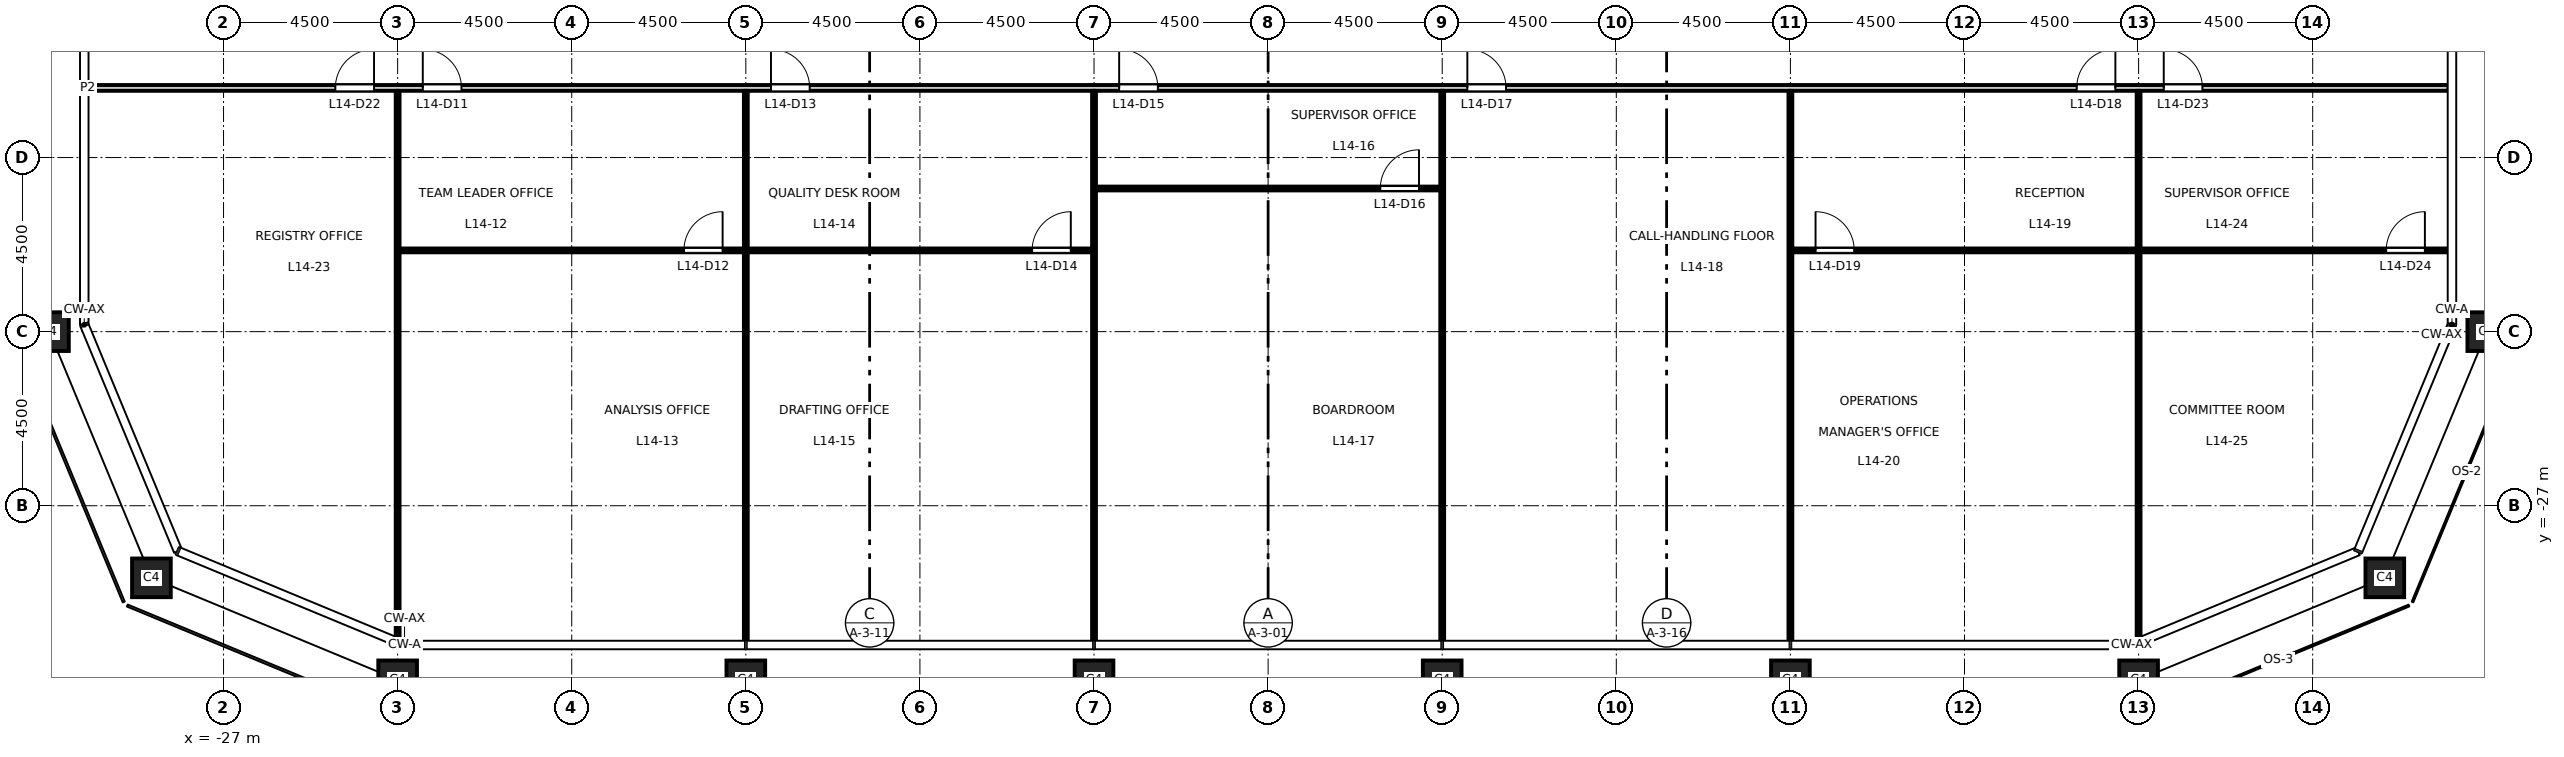
"""IFC4 building model, lengths in metres.
Left out: names, types, materials, properties, quantities, classifications, styles, units other than length and angle.
Written with IfcOpenShell. Run it as: python <this file> out.ifc"""

import sys

from ifc_helpers import new_model, si_unit, direction, frame, frame_2d, origin, origin_2d, place, context, subcontext, project, spatial, rectangle, hollow_rectangle, extrude, element, fill, save


model = new_model("IFC4")
c1 = context("Model", 3, precision=1e-05, world=origin(), true_north=direction((0.0, 1.0)))
c2 = subcontext(c1, "Body", "Model", "MODEL_VIEW")
j1 = project(units=[si_unit("LENGTHUNIT", "METRE"), si_unit("PLANEANGLEUNIT", "RADIAN")], contexts=[c1])
p1 = place(None, origin())
s1 = spatial("IfcSite", under=j1, at=p1, CompositionType="ELEMENT")
p2 = place(p1, origin())
s2 = spatial("IfcBuilding", under=s1, at=p2, CompositionType="ELEMENT")
p3 = place(p2, frame((0.0, 0.0, 67.2)))
s3 = spatial("IfcBuildingStorey", under=s2, at=p3, CompositionType="ELEMENT", Elevation=67.2)
for number, where, z_axis, x_axis in (
    (1, (-22.5, -31.5, 0.0), (0.0, 0.0, 1.0), (1.0, 0.0, 0.0)),
    (2, (-13.5, -31.5, 0.0), (0.0, 0.0, 1.0), (1.0, 0.0, 0.0)),
    (3, (-4.5, -31.5, 0.0), (0.0, 0.0, 1.0), (1.0, 0.0, 0.0)),
    (4, (4.5, -31.5, 0.0), (0.0, 0.0, 1.0), (1.0, 0.0, 0.0)),
    (5, (13.5, -31.5, 0.0), (0.0, 0.0, 1.0), (1.0, 0.0, 0.0)),
    (6, (22.5, -31.5, 0.0), (0.0, 0.0, 1.0), (1.0, 0.0, 0.0)),
    (7, (28.864, -28.864, 0.0), (0.0, 0.0, 1.0), (1.0, 0.0, 0.0)),
    (8, (31.5, -22.5, 0.0), (0.0, 0.0, 1.0), (1.0, 0.0, 0.0)),
    (9, (-31.5, -22.5, 0.0), (0.0, 0.0, 1.0), (1.0, 0.0, 0.0)),
    (10, (-28.864, -28.864, 0.0), (0.0, 0.0, 1.0), (1.0, 0.0, 0.0)),
):
    element("IfcColumn", number, at=place(p3, frame(where, z_axis=z_axis, x_axis=x_axis)), inside=s3, PredefinedType="COLUMN", context=c2, shape_type="SweptSolid", body=[
        extrude(hollow_rectangle(XDim=1.0, YDim=1.0, WallThickness=0.06, at=origin_2d()), origin(), (0.0, 0.0, 1.0), 4.5),
    ])
p4 = place(p3, frame((-22.45, -20.4, 0.0), z_axis=(0.0, 0.0, 1.0), x_axis=(1.0, 0.0, 0.0)))
e11 = element("IfcWall", 11, at=p4, inside=s3, PredefinedType="PARTITIONING", context=c2, shape_type="SweptSolid", body=[
    extrude(rectangle(XDim=17.9, YDim=0.1, at=frame_2d((8.95, 0.0))), origin(), (0.0, 0.0, 1.0), 4.35),
])
p5 = place(p4, frame((7.35, 0.0, 0.0)))
e12 = element("IfcOpeningElement", 12, at=p5, cuts=e11, PredefinedType="OPENING", context=c2, shape_type="SweptSolid", body=[
    extrude(rectangle(XDim=1.0, YDim=2.1, at=frame_2d((0.5, 1.05))), frame((0.0, 0.06, 0.0), z_axis=(0.0, -1.0, 0.0), x_axis=(1.0, 0.0, 0.0)), (0.0, 0.0, 1.0), 0.12),
])
p6 = place(p4, frame((16.35, 0.0, 0.0)))
e13 = element("IfcOpeningElement", 13, at=p6, cuts=e11, PredefinedType="OPENING", context=c2, shape_type="SweptSolid", body=[
    extrude(rectangle(XDim=1.0, YDim=2.1, at=frame_2d((0.5, 1.05))), frame((0.0, 0.06, 0.0), z_axis=(0.0, -1.0, 0.0), x_axis=(1.0, 0.0, 0.0)), (0.0, 0.0, 1.0), 0.12),
])
p7 = place(p3, frame((13.55, -20.4, 0.0), z_axis=(0.0, 0.0, 1.0), x_axis=(1.0, 0.0, 0.0)))
e14 = element("IfcWall", 14, at=p7, inside=s3, PredefinedType="PARTITIONING", context=c2, shape_type="SweptSolid", body=[
    extrude(rectangle(XDim=16.96, YDim=0.1, at=frame_2d((8.48, 0.0))), origin(), (0.0, 0.0, 1.0), 4.35),
])
p8 = place(p7, frame((0.6, 0.0, 0.0)))
e15 = element("IfcOpeningElement", 15, at=p8, cuts=e14, PredefinedType="OPENING", context=c2, shape_type="SweptSolid", body=[
    extrude(rectangle(XDim=1.0, YDim=2.1, at=frame_2d((0.5, 1.05))), frame((0.0, 0.06, 0.0), z_axis=(0.0, -1.0, 0.0), x_axis=(1.0, 0.0, 0.0)), (0.0, 0.0, 1.0), 0.12),
])
p9 = place(p7, frame((15.35, 0.0, 0.0)))
e16 = element("IfcOpeningElement", 16, at=p9, cuts=e14, PredefinedType="OPENING", context=c2, shape_type="SweptSolid", body=[
    extrude(rectangle(XDim=1.0, YDim=2.1, at=frame_2d((0.5, 1.05))), frame((0.0, 0.06, 0.0), z_axis=(0.0, -1.0, 0.0), x_axis=(1.0, 0.0, 0.0)), (0.0, 0.0, 1.0), 0.12),
])
p10 = place(p3, frame((-4.45, -18.8, 0.0), z_axis=(0.0, 0.0, 1.0), x_axis=(1.0, 0.0, 0.0)))
e17 = element("IfcWall", 17, at=p10, inside=s3, PredefinedType="PARTITIONING", context=c2, shape_type="SweptSolid", body=[
    extrude(rectangle(XDim=8.9, YDim=0.1, at=frame_2d((4.45, 0.0))), origin(), (0.0, 0.0, 1.0), 4.35),
])
p11 = place(p10, frame((7.35, 0.0, 0.0)))
e18 = element("IfcOpeningElement", 18, at=p11, cuts=e17, PredefinedType="OPENING", context=c2, shape_type="SweptSolid", body=[
    extrude(rectangle(XDim=1.0, YDim=2.1, at=frame_2d((0.5, 1.05))), frame((0.0, 0.06, 0.0), z_axis=(0.0, -1.0, 0.0), x_axis=(1.0, 0.0, 0.0)), (0.0, 0.0, 1.0), 0.12),
])
p12 = place(p3, frame((-30.51, -16.2, 0.0), z_axis=(0.0, 0.0, 1.0), x_axis=(1.0, 0.0, 0.0)))
e19 = element("IfcWall", 19, at=p12, inside=s3, PredefinedType="PARTITIONING", context=c2, shape_type="SweptSolid", body=[
    extrude(rectangle(XDim=61.02, YDim=0.15, at=frame_2d((30.51, 0.0))), origin(), (0.0, 0.0, 1.0), 4.35),
])
p13 = place(p12, frame((8.66, 0.0, 0.0)))
e20 = element("IfcOpeningElement", 20, at=p13, cuts=e19, PredefinedType="OPENING", context=c2, shape_type="SweptSolid", body=[
    extrude(rectangle(XDim=1.0, YDim=2.1, at=frame_2d((0.5, 1.05))), frame((0.0, 0.085, 0.0), z_axis=(0.0, -1.0, 0.0), x_axis=(1.0, 0.0, 0.0)), (0.0, 0.0, 1.0), 0.17),
])
p14 = place(p12, frame((17.66, 0.0, 0.0)))
e21 = element("IfcOpeningElement", 21, at=p14, cuts=e19, PredefinedType="OPENING", context=c2, shape_type="SweptSolid", body=[
    extrude(rectangle(XDim=1.0, YDim=2.1, at=frame_2d((0.5, 1.05))), frame((0.0, 0.085, 0.0), z_axis=(0.0, -1.0, 0.0), x_axis=(1.0, 0.0, 0.0)), (0.0, 0.0, 1.0), 0.17),
])
p15 = place(p12, frame((26.66, 0.0, 0.0)))
e22 = element("IfcOpeningElement", 22, at=p15, cuts=e19, PredefinedType="OPENING", context=c2, shape_type="SweptSolid", body=[
    extrude(rectangle(XDim=1.0, YDim=2.1, at=frame_2d((0.5, 1.05))), frame((0.0, 0.085, 0.0), z_axis=(0.0, -1.0, 0.0), x_axis=(1.0, 0.0, 0.0)), (0.0, 0.0, 1.0), 0.17),
])
p16 = place(p12, frame((35.66, 0.0, 0.0)))
e23 = element("IfcOpeningElement", 23, at=p16, cuts=e19, PredefinedType="OPENING", context=c2, shape_type="SweptSolid", body=[
    extrude(rectangle(XDim=1.0, YDim=2.1, at=frame_2d((0.5, 1.05))), frame((0.0, 0.085, 0.0), z_axis=(0.0, -1.0, 0.0), x_axis=(1.0, 0.0, 0.0)), (0.0, 0.0, 1.0), 0.17),
])
p17 = place(p12, frame((51.41, 0.0, 0.0)))
e24 = element("IfcOpeningElement", 24, at=p17, cuts=e19, PredefinedType="OPENING", context=c2, shape_type="SweptSolid", body=[
    extrude(rectangle(XDim=1.0, YDim=2.1, at=frame_2d((0.5, 1.05))), frame((0.0, 0.085, 0.0), z_axis=(0.0, -1.0, 0.0), x_axis=(1.0, 0.0, 0.0)), (0.0, 0.0, 1.0), 0.17),
])
p18 = place(p12, frame((6.4, 0.0, 0.0)))
e25 = element("IfcOpeningElement", 25, at=p18, cuts=e19, PredefinedType="OPENING", context=c2, shape_type="SweptSolid", body=[
    extrude(rectangle(XDim=1.0, YDim=2.1, at=frame_2d((0.5, 1.05))), frame((0.0, 0.085, 0.0), z_axis=(0.0, -1.0, 0.0), x_axis=(1.0, 0.0, 0.0)), (0.0, 0.0, 1.0), 0.17),
])
p19 = place(p12, frame((53.66, 0.0, 0.0)))
e26 = element("IfcOpeningElement", 26, at=p19, cuts=e19, PredefinedType="OPENING", context=c2, shape_type="SweptSolid", body=[
    extrude(rectangle(XDim=1.0, YDim=2.1, at=frame_2d((0.5, 1.05))), frame((0.0, 0.085, 0.0), z_axis=(0.0, -1.0, 0.0), x_axis=(1.0, 0.0, 0.0)), (0.0, 0.0, 1.0), 0.17),
])
p20 = place(p3, frame((-22.5, -30.428, 0.0), z_axis=(0.0, 0.0, 1.0), x_axis=(0.0, 1.0, 0.0)))
e27 = element("IfcWall", 27, at=p20, inside=s3, PredefinedType="PARTITIONING", context=c2, shape_type="SweptSolid", body=[
    extrude(rectangle(XDim=14.153, YDim=0.1, at=frame_2d((7.077, 0.0))), origin(), (0.0, 0.0, 1.0), 3.35),
])
p21 = place(p3, frame((-13.5, -30.51, 0.0), z_axis=(0.0, 0.0, 1.0), x_axis=(0.0, 1.0, 0.0)))
e28 = element("IfcWall", 28, at=p21, inside=s3, PredefinedType="PARTITIONING", context=c2, shape_type="SweptSolid", body=[
    extrude(rectangle(XDim=10.06, YDim=0.1, at=frame_2d((5.03, 0.0))), origin(), (0.0, 0.0, 1.0), 3.35),
])
p22 = place(p3, frame((-13.5, -20.35, 0.0), z_axis=(0.0, 0.0, 1.0), x_axis=(0.0, 1.0, 0.0)))
e29 = element("IfcWall", 29, at=p22, inside=s3, PredefinedType="PARTITIONING", context=c2, shape_type="SweptSolid", body=[
    extrude(rectangle(XDim=4.075, YDim=0.1, at=frame_2d((2.038, 0.0))), origin(), (0.0, 0.0, 1.0), 3.35),
])
for number, where, z_axis, x_axis in (
    (30, (-4.5, -30.51, 0.0), (0.0, 0.0, 1.0), (0.0, 1.0, 0.0)),
    (31, (4.5, -30.51, 0.0), (0.0, 0.0, 1.0), (0.0, 1.0, 0.0)),
    (32, (13.5, -30.51, 0.0), (0.0, 0.0, 1.0), (0.0, 1.0, 0.0)),
):
    element("IfcWall", number, at=place(p3, frame(where, z_axis=z_axis, x_axis=x_axis)), inside=s3, PredefinedType="PARTITIONING", context=c2, shape_type="SweptSolid", body=[
        extrude(rectangle(XDim=14.235, YDim=0.1, at=frame_2d((7.118, 0.0))), origin(), (0.0, 0.0, 1.0), 3.35),
    ])
p23 = place(p3, frame((22.5, -30.428, 0.0), z_axis=(0.0, 0.0, 1.0), x_axis=(0.0, 1.0, 0.0)))
e33 = element("IfcWall", 33, at=p23, inside=s3, PredefinedType="PARTITIONING", context=c2, shape_type="SweptSolid", body=[
    extrude(rectangle(XDim=9.978, YDim=0.1, at=frame_2d((4.989, 0.0))), origin(), (0.0, 0.0, 1.0), 3.35),
])
p24 = place(p3, frame((22.5, -20.35, 0.0), z_axis=(0.0, 0.0, 1.0), x_axis=(0.0, 1.0, 0.0)))
e34 = element("IfcWall", 34, at=p24, inside=s3, PredefinedType="PARTITIONING", context=c2, shape_type="SweptSolid", body=[
    extrude(rectangle(XDim=4.075, YDim=0.1, at=frame_2d((2.038, 0.0))), origin(), (0.0, 0.0, 1.0), 3.35),
])
p25 = place(p13, origin())
e35 = element("IfcDoor", 35, at=p25, inside=s3, OperationType="SINGLE_SWING_LEFT", PredefinedType="DOOR", context=c2, shape_type="SweptSolid", body=[
    extrude(rectangle(XDim=1.0, YDim=2.1, at=frame_2d((0.5, 1.05))), frame((0.0, 0.025, 0.0), z_axis=(0.0, -1.0, 0.0), x_axis=(1.0, 0.0, 0.0)), (0.0, 0.0, 1.0), 0.05),
])
fill(e20, e35)
p26 = place(p5, origin())
e36 = element("IfcDoor", 36, at=p26, inside=s3, OperationType="SINGLE_SWING_RIGHT", PredefinedType="DOOR", context=c2, shape_type="SweptSolid", body=[
    extrude(rectangle(XDim=1.0, YDim=2.1, at=frame_2d((0.5, 1.05))), frame((0.0, 0.025, 0.0), z_axis=(0.0, -1.0, 0.0), x_axis=(1.0, 0.0, 0.0)), (0.0, 0.0, 1.0), 0.05),
])
fill(e12, e36)
p27 = place(p14, origin())
e37 = element("IfcDoor", 37, at=p27, inside=s3, OperationType="SINGLE_SWING_LEFT", PredefinedType="DOOR", context=c2, shape_type="SweptSolid", body=[
    extrude(rectangle(XDim=1.0, YDim=2.1, at=frame_2d((0.5, 1.05))), frame((0.0, 0.025, 0.0), z_axis=(0.0, -1.0, 0.0), x_axis=(1.0, 0.0, 0.0)), (0.0, 0.0, 1.0), 0.05),
])
fill(e21, e37)
p28 = place(p6, origin())
e38 = element("IfcDoor", 38, at=p28, inside=s3, OperationType="SINGLE_SWING_RIGHT", PredefinedType="DOOR", context=c2, shape_type="SweptSolid", body=[
    extrude(rectangle(XDim=1.0, YDim=2.1, at=frame_2d((0.5, 1.05))), frame((0.0, 0.025, 0.0), z_axis=(0.0, -1.0, 0.0), x_axis=(1.0, 0.0, 0.0)), (0.0, 0.0, 1.0), 0.05),
])
fill(e13, e38)
p29 = place(p15, origin())
e39 = element("IfcDoor", 39, at=p29, inside=s3, OperationType="SINGLE_SWING_LEFT", PredefinedType="DOOR", context=c2, shape_type="SweptSolid", body=[
    extrude(rectangle(XDim=1.0, YDim=2.1, at=frame_2d((0.5, 1.05))), frame((0.0, 0.025, 0.0), z_axis=(0.0, -1.0, 0.0), x_axis=(1.0, 0.0, 0.0)), (0.0, 0.0, 1.0), 0.05),
])
fill(e22, e39)
p30 = place(p11, origin())
e40 = element("IfcDoor", 40, at=p30, inside=s3, OperationType="SINGLE_SWING_RIGHT", PredefinedType="DOOR", context=c2, shape_type="SweptSolid", body=[
    extrude(rectangle(XDim=1.0, YDim=2.1, at=frame_2d((0.5, 1.05))), frame((0.0, 0.025, 0.0), z_axis=(0.0, -1.0, 0.0), x_axis=(1.0, 0.0, 0.0)), (0.0, 0.0, 1.0), 0.05),
])
fill(e18, e40)
p31 = place(p16, origin())
e41 = element("IfcDoor", 41, at=p31, inside=s3, OperationType="SINGLE_SWING_LEFT", PredefinedType="DOOR", context=c2, shape_type="SweptSolid", body=[
    extrude(rectangle(XDim=1.0, YDim=2.1, at=frame_2d((0.5, 1.05))), frame((0.0, 0.025, 0.0), z_axis=(0.0, -1.0, 0.0), x_axis=(1.0, 0.0, 0.0)), (0.0, 0.0, 1.0), 0.05),
])
fill(e23, e41)
p32 = place(p17, origin())
e42 = element("IfcDoor", 42, at=p32, inside=s3, OperationType="SINGLE_SWING_RIGHT", PredefinedType="DOOR", context=c2, shape_type="SweptSolid", body=[
    extrude(rectangle(XDim=1.0, YDim=2.1, at=frame_2d((0.5, 1.05))), frame((0.0, 0.025, 0.0), z_axis=(0.0, -1.0, 0.0), x_axis=(1.0, 0.0, 0.0)), (0.0, 0.0, 1.0), 0.05),
])
fill(e24, e42)
p33 = place(p8, origin())
e43 = element("IfcDoor", 43, at=p33, inside=s3, OperationType="SINGLE_SWING_LEFT", PredefinedType="DOOR", context=c2, shape_type="SweptSolid", body=[
    extrude(rectangle(XDim=1.0, YDim=2.1, at=frame_2d((0.5, 1.05))), frame((0.0, 0.025, 0.0), z_axis=(0.0, -1.0, 0.0), x_axis=(1.0, 0.0, 0.0)), (0.0, 0.0, 1.0), 0.05),
])
fill(e15, e43)
p34 = place(p18, origin())
e44 = element("IfcDoor", 44, at=p34, inside=s3, OperationType="SINGLE_SWING_RIGHT", PredefinedType="DOOR", context=c2, shape_type="SweptSolid", body=[
    extrude(rectangle(XDim=1.0, YDim=2.1, at=frame_2d((0.5, 1.05))), frame((0.0, 0.025, 0.0), z_axis=(0.0, -1.0, 0.0), x_axis=(1.0, 0.0, 0.0)), (0.0, 0.0, 1.0), 0.05),
])
fill(e25, e44)
p35 = place(p19, origin())
e45 = element("IfcDoor", 45, at=p35, inside=s3, OperationType="SINGLE_SWING_LEFT", PredefinedType="DOOR", context=c2, shape_type="SweptSolid", body=[
    extrude(rectangle(XDim=1.0, YDim=2.1, at=frame_2d((0.5, 1.05))), frame((0.0, 0.025, 0.0), z_axis=(0.0, -1.0, 0.0), x_axis=(1.0, 0.0, 0.0)), (0.0, 0.0, 1.0), 0.05),
])
fill(e26, e45)
p36 = place(p9, origin())
e46 = element("IfcDoor", 46, at=p36, inside=s3, OperationType="SINGLE_SWING_RIGHT", PredefinedType="DOOR", context=c2, shape_type="SweptSolid", body=[
    extrude(rectangle(XDim=1.0, YDim=2.1, at=frame_2d((0.5, 1.05))), frame((0.0, 0.025, 0.0), z_axis=(0.0, -1.0, 0.0), x_axis=(1.0, 0.0, 0.0)), (0.0, 0.0, 1.0), 0.05),
])
fill(e16, e46)
save(model, sys.argv[1])
